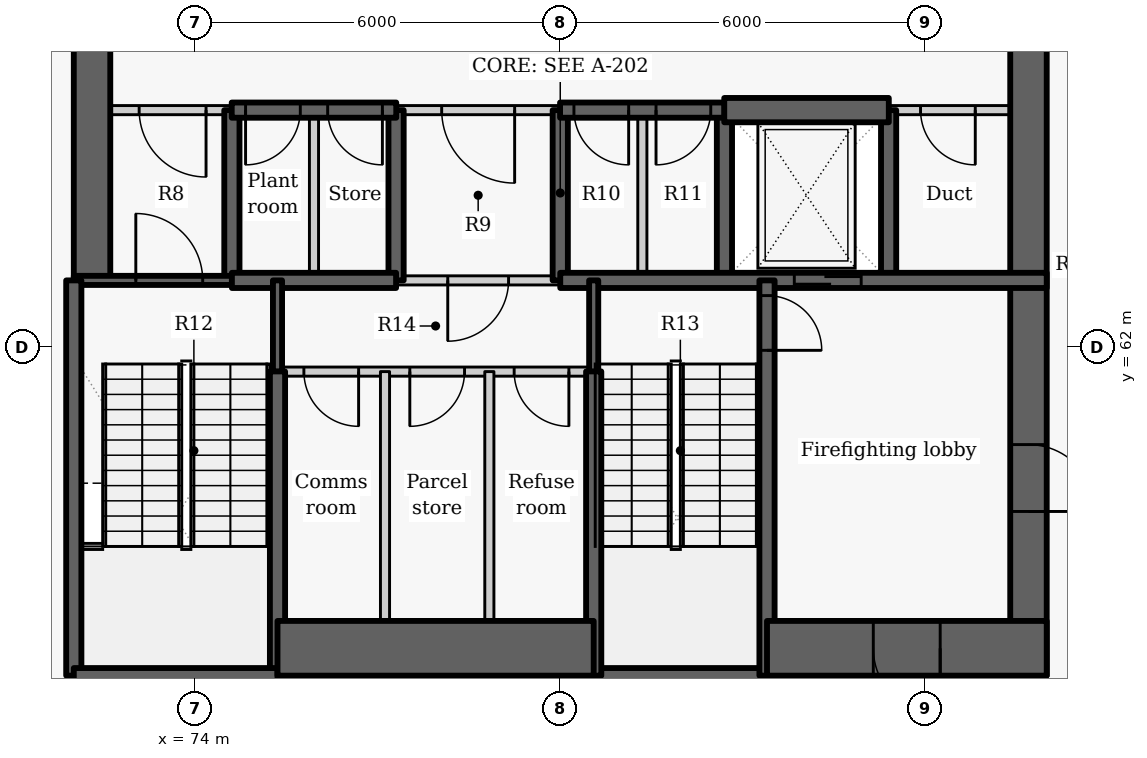
"""IFC4 building model, lengths in metres.
Left out: names, types, materials, properties, quantities, classifications, styles, units other than length and angle.
Written with IfcOpenShell. Run it as: python <this file> out.ifc"""

import sys

from ifc_helpers import new_model, si_unit, direction, frame, frame_2d, origin, place, context, subcontext, project, spatial, rectangle, extrude, element, fill, save


model = new_model("IFC4")
c1 = context("Model", 3, precision=1e-05, world=origin(), true_north=direction((0.0, 1.0)))
c2 = subcontext(c1, "Body", "Model", "MODEL_VIEW")
j1 = project(units=[si_unit("LENGTHUNIT", "METRE"), si_unit("PLANEANGLEUNIT", "RADIAN")], contexts=[c1])
p1 = place(None, origin())
s1 = spatial("IfcSite", under=j1, at=p1, CompositionType="ELEMENT")
p2 = place(p1, origin())
s2 = spatial("IfcBuilding", under=s1, at=p2, CompositionType="ELEMENT")
p3 = place(p2, frame((0.0, 0.0, 6.6)))
s3 = spatial("IfcBuildingStorey", under=s2, at=p3, CompositionType="ELEMENT", Elevation=6.6)
p4 = place(p3, frame((74.6, 63.1, -0.3), z_axis=(0.0, 0.0, 1.0), x_axis=(0.0, 1.0, 0.0)))
e1 = element("IfcWall", 1, at=p4, inside=s3, PredefinedType="SHEAR", context=c2, shape_type="SweptSolid", body=[
    extrude(rectangle(XDim=2.8, YDim=0.25, at=frame_2d((1.4, 0.0))), origin(), (0.0, 0.0, 1.0), 4.8),
])
p5 = place(p3, frame((72.3, 63.1, -0.3), z_axis=(0.0, 0.0, 1.0), x_axis=(0.0, 1.0, 0.0)))
e2 = element("IfcWall", 2, at=p5, inside=s3, PredefinedType="SHEAR", context=c2, shape_type="SweptSolid", body=[
    extrude(rectangle(XDim=9.1, YDim=0.6, at=frame_2d((4.55, 0.0))), origin(), (0.0, 0.0, 1.0), 4.8),
])
for number, where, z_axis, x_axis in (
    (3, (77.3, 63.1, -0.3), (0.0, 0.0, 1.0), (0.0, 1.0, 0.0)),
    (4, (80.0, 63.1, -0.3), (0.0, 0.0, 1.0), (0.0, 1.0, 0.0)),
    (5, (82.7, 63.1, -0.3), (0.0, 0.0, 1.0), (0.0, 1.0, 0.0)),
    (6, (85.4, 63.1, -0.3), (0.0, 0.0, 1.0), (0.0, 1.0, 0.0)),
):
    element("IfcWall", number, at=place(p3, frame(where, z_axis=z_axis, x_axis=x_axis)), inside=s3, PredefinedType="SHEAR", context=c2, shape_type="SweptSolid", body=[
        extrude(rectangle(XDim=2.8, YDim=0.25, at=frame_2d((1.4, 0.0))), origin(), (0.0, 0.0, 1.0), 4.8),
    ])
p6 = place(p3, frame((87.7, 72.2, -0.3), z_axis=(0.0, 0.0, 1.0), x_axis=(0.0, -1.0, 0.0)))
e7 = element("IfcWall", 7, at=p6, inside=s3, PredefinedType="SHEAR", context=c2, shape_type="SweptSolid", body=[
    extrude(rectangle(XDim=15.6, YDim=0.6, at=frame_2d((7.8, 0.0))), origin(), (0.0, 0.0, 1.0), 4.8),
])
p7 = place(p6, frame((11.8, 0.0, 0.3)))
e8 = element("IfcOpeningElement", 8, at=p7, cuts=e7, PredefinedType="OPENING", context=c2, shape_type="SweptSolid", body=[
    extrude(rectangle(XDim=1.1, YDim=2.1, at=frame_2d((0.55, 1.05))), frame((0.0, 0.31, 0.0), z_axis=(0.0, -1.0, 0.0), x_axis=(1.0, 0.0, 0.0)), (0.0, 0.0, 1.0), 0.62),
])
p8 = place(p3, frame((74.603, 65.9, 0.0), z_axis=(0.0, 0.0, 1.0), x_axis=(-1.0, 0.0, 0.0)))
e9 = element("IfcWall", 9, at=p8, inside=s3, PredefinedType="PARTITIONING", context=c2, shape_type="SweptSolid", body=[
    extrude(rectangle(XDim=2.603, YDim=0.15, at=frame_2d((1.302, 0.0))), origin(), (0.0, 0.0, 1.0), 4.5),
])
p9 = place(p8, frame((0.428, 0.0, 0.0)))
e10 = element("IfcOpeningElement", 10, at=p9, cuts=e9, PredefinedType="OPENING", context=c2, shape_type="SweptSolid", body=[
    extrude(rectangle(XDim=1.1, YDim=2.1, at=frame_2d((0.55, 1.05))), frame((0.0, 0.085, 0.0), z_axis=(0.0, -1.0, 0.0), x_axis=(1.0, 0.0, 0.0)), (0.0, 0.0, 1.0), 0.17),
])
p10 = place(p3, frame((80.003, 65.9, 0.0), z_axis=(0.0, 0.0, 1.0), x_axis=(-1.0, 0.0, 0.0)))
e11 = element("IfcWall", 11, at=p10, inside=s3, PredefinedType="PARTITIONING", context=c2, shape_type="SweptSolid", body=[
    extrude(rectangle(XDim=2.706, YDim=0.15, at=frame_2d((1.353, 0.0))), origin(), (0.0, 0.0, 1.0), 4.5),
])
p11 = place(p10, frame((0.753, 0.0, 0.0)))
e12 = element("IfcOpeningElement", 12, at=p11, cuts=e11, PredefinedType="OPENING", context=c2, shape_type="SweptSolid", body=[
    extrude(rectangle(XDim=1.2, YDim=2.1, at=frame_2d((0.6, 1.05))), frame((0.0, 0.085, 0.0), z_axis=(0.0, -1.0, 0.0), x_axis=(1.0, 0.0, 0.0)), (0.0, 0.0, 1.0), 0.17),
])
p12 = place(p3, frame((88.0, 65.9, 0.0), z_axis=(0.0, 0.0, 1.0), x_axis=(-1.0, 0.0, 0.0)))
e13 = element("IfcWall", 13, at=p12, inside=s3, PredefinedType="PARTITIONING", context=c2, shape_type="SweptSolid", body=[
    extrude(rectangle(XDim=2.603, YDim=0.15, at=frame_2d((1.302, 0.0))), origin(), (0.0, 0.0, 1.0), 4.5),
])
p13 = place(p12, frame((1.175, 0.0, 0.0)))
e14 = element("IfcOpeningElement", 14, at=p13, cuts=e13, PredefinedType="OPENING", context=c2, shape_type="SweptSolid", body=[
    extrude(rectangle(XDim=0.9, YDim=2.1, at=frame_2d((0.45, 1.05))), frame((0.0, 0.085, 0.0), z_axis=(0.0, -1.0, 0.0), x_axis=(1.0, 0.0, 0.0)), (0.0, 0.0, 1.0), 0.17),
])
p14 = place(p3, frame((77.303, 65.9, -0.3), z_axis=(0.0, 0.0, 1.0), x_axis=(-1.0, 0.0, 0.0)))
e15 = element("IfcWall", 15, at=p14, inside=s3, PredefinedType="SHEAR", context=c2, shape_type="SweptSolid", body=[
    extrude(rectangle(XDim=2.706, YDim=0.25, at=frame_2d((1.353, 0.0))), origin(), (0.0, 0.0, 1.0), 4.8),
])
p15 = place(p14, frame((1.578, 0.0, 0.3)))
e16 = element("IfcOpeningElement", 16, at=p15, cuts=e15, PredefinedType="OPENING", context=c2, shape_type="SweptSolid", body=[
    extrude(rectangle(XDim=0.9, YDim=2.1, at=frame_2d((0.45, 1.05))), frame((0.0, 0.135, 0.0), z_axis=(0.0, -1.0, 0.0), x_axis=(1.0, 0.0, 0.0)), (0.0, 0.0, 1.0), 0.27),
])
p16 = place(p14, frame((0.228, 0.0, 0.3)))
e17 = element("IfcOpeningElement", 17, at=p16, cuts=e15, PredefinedType="OPENING", context=c2, shape_type="SweptSolid", body=[
    extrude(rectangle(XDim=0.9, YDim=2.1, at=frame_2d((0.45, 1.05))), frame((0.0, 0.135, 0.0), z_axis=(0.0, -1.0, 0.0), x_axis=(1.0, 0.0, 0.0)), (0.0, 0.0, 1.0), 0.27),
])
p17 = place(p3, frame((82.703, 65.9, -0.3), z_axis=(0.0, 0.0, 1.0), x_axis=(-1.0, 0.0, 0.0)))
e18 = element("IfcWall", 18, at=p17, inside=s3, PredefinedType="SHEAR", context=c2, shape_type="SweptSolid", body=[
    extrude(rectangle(XDim=2.706, YDim=0.25, at=frame_2d((1.353, 0.0))), origin(), (0.0, 0.0, 1.0), 4.8),
])
p18 = place(p17, frame((1.578, 0.0, 0.3)))
e19 = element("IfcOpeningElement", 19, at=p18, cuts=e18, PredefinedType="OPENING", context=c2, shape_type="SweptSolid", body=[
    extrude(rectangle(XDim=0.9, YDim=2.1, at=frame_2d((0.45, 1.05))), frame((0.0, 0.135, 0.0), z_axis=(0.0, -1.0, 0.0), x_axis=(1.0, 0.0, 0.0)), (0.0, 0.0, 1.0), 0.27),
])
p19 = place(p17, frame((0.228, 0.0, 0.3)))
e20 = element("IfcOpeningElement", 20, at=p19, cuts=e18, PredefinedType="OPENING", context=c2, shape_type="SweptSolid", body=[
    extrude(rectangle(XDim=0.9, YDim=2.1, at=frame_2d((0.45, 1.05))), frame((0.0, 0.135, 0.0), z_axis=(0.0, -1.0, 0.0), x_axis=(1.0, 0.0, 0.0)), (0.0, 0.0, 1.0), 0.27),
])
p20 = place(p3, frame((82.697, 65.9, -0.3), z_axis=(0.0, 0.0, 1.0), x_axis=(1.0, 0.0, 0.0)))
e21 = element("IfcWall", 21, at=p20, inside=s3, PredefinedType="SHEAR", context=c2, shape_type="SweptSolid", body=[
    extrude(rectangle(XDim=2.706, YDim=0.4, at=frame_2d((1.353, 0.0))), origin(), (0.0, 0.0, 1.0), 4.8),
])
p21 = place(p3, frame((72.0, 63.1, -0.3), z_axis=(0.0, 0.0, 1.0), x_axis=(1.0, 0.0, 0.0)))
e22 = element("IfcWall", 22, at=p21, inside=s3, PredefinedType="SHEAR", context=c2, shape_type="SweptSolid", body=[
    extrude(rectangle(XDim=2.6, YDim=0.15, at=frame_2d((1.3, 0.0))), origin(), (0.0, 0.0, 1.0), 4.8),
])
p22 = place(p21, frame((1.02, 0.0, 0.3)))
e23 = element("IfcOpeningElement", 23, at=p22, cuts=e22, PredefinedType="OPENING", context=c2, shape_type="SweptSolid", body=[
    extrude(rectangle(XDim=1.1, YDim=2.1, at=frame_2d((0.55, 1.05))), frame((0.0, 0.085, 0.0), z_axis=(0.0, -1.0, 0.0), x_axis=(1.0, 0.0, 0.0)), (0.0, 0.0, 1.0), 0.17),
])
p23 = place(p3, frame((75.95, 63.1, 0.0), z_axis=(0.0, 0.0, 1.0), x_axis=(0.0, 1.0, 0.0)))
e24 = element("IfcWall", 24, at=p23, inside=s3, PredefinedType="PARTITIONING", context=c2, shape_type="SweptSolid", body=[
    extrude(rectangle(XDim=2.8, YDim=0.15, at=frame_2d((1.4, 0.0))), origin(), (0.0, 0.0, 1.0), 4.5),
])
p24 = place(p3, frame((74.6, 63.1, -0.3), z_axis=(0.0, 0.0, 1.0), x_axis=(1.0, 0.0, 0.0)))
e25 = element("IfcWall", 25, at=p24, inside=s3, PredefinedType="SHEAR", context=c2, shape_type="SweptSolid", body=[
    extrude(rectangle(XDim=2.7, YDim=0.25, at=frame_2d((1.35, 0.0))), origin(), (0.0, 0.0, 1.0), 4.8),
])
p25 = place(p3, frame((80.0, 63.1, -0.3), z_axis=(0.0, 0.0, 1.0), x_axis=(1.0, 0.0, 0.0)))
e26 = element("IfcWall", 26, at=p25, inside=s3, PredefinedType="SHEAR", context=c2, shape_type="SweptSolid", body=[
    extrude(rectangle(XDim=8.0, YDim=0.25, at=frame_2d((4.0, 0.0))), origin(), (0.0, 0.0, 1.0), 4.8),
])
p26 = place(p25, frame((3.849, 0.0, 0.3)))
e27 = element("IfcOpeningElement", 27, at=p26, cuts=e26, PredefinedType="OPENING", context=c2, shape_type="SweptSolid", body=[
    extrude(rectangle(XDim=1.1, YDim=2.1, at=frame_2d((0.55, 1.05))), frame((0.0, 0.135, 0.0), z_axis=(0.0, -1.0, 0.0), x_axis=(1.0, 0.0, 0.0)), (0.0, 0.0, 1.0), 0.27),
])
p27 = place(p3, frame((80.0, 63.1, 0.0), z_axis=(0.0, 0.0, 1.0), x_axis=(-1.0, 0.0, 0.0)))
e28 = element("IfcWall", 28, at=p27, inside=s3, PredefinedType="PARTITIONING", context=c2, shape_type="SweptSolid", body=[
    extrude(rectangle(XDim=2.7, YDim=0.15, at=frame_2d((1.35, 0.0))), origin(), (0.0, 0.0, 1.0), 4.5),
])
p28 = place(p27, frame((0.85, 0.0, 0.0)))
e29 = element("IfcOpeningElement", 29, at=p28, cuts=e28, PredefinedType="OPENING", context=c2, shape_type="SweptSolid", body=[
    extrude(rectangle(XDim=1.0, YDim=2.1, at=frame_2d((0.5, 1.05))), frame((0.0, 0.085, 0.0), z_axis=(0.0, -1.0, 0.0), x_axis=(1.0, 0.0, 0.0)), (0.0, 0.0, 1.0), 0.17),
])
p29 = place(p3, frame((81.35, 63.1, 0.0), z_axis=(0.0, 0.0, 1.0), x_axis=(0.0, 1.0, 0.0)))
e30 = element("IfcWall", 30, at=p29, inside=s3, PredefinedType="PARTITIONING", context=c2, shape_type="SweptSolid", body=[
    extrude(rectangle(XDim=2.8, YDim=0.15, at=frame_2d((1.4, 0.0))), origin(), (0.0, 0.0, 1.0), 4.5),
])
p30 = place(p3, frame((75.35, 61.597, -0.3), z_axis=(0.0, 0.0, 1.0), x_axis=(0.0, 1.0, 0.0)))
e31 = element("IfcWall", 31, at=p30, inside=s3, PredefinedType="SHEAR", context=c2, shape_type="SweptSolid", body=[
    extrude(rectangle(XDim=1.503, YDim=0.15, at=frame_2d((0.751, 0.0))), origin(), (0.0, 0.0, 1.0), 4.8),
])
p31 = place(p3, frame((75.35, 56.6, -0.3), z_axis=(0.0, 0.0, 1.0), x_axis=(0.0, 1.0, 0.0)))
e32 = element("IfcWall", 32, at=p31, inside=s3, PredefinedType="SHEAR", context=c2, shape_type="SweptSolid", body=[
    extrude(rectangle(XDim=5.003, YDim=0.25, at=frame_2d((2.501, 0.0))), origin(), (0.0, 0.0, 1.0), 4.8),
])
p32 = place(p3, frame((72.0, 56.6, -0.3), z_axis=(0.0, 0.0, 1.0), x_axis=(0.0, 1.0, 0.0)))
e33 = element("IfcWall", 33, at=p32, inside=s3, PredefinedType="SHEAR", context=c2, shape_type="SweptSolid", body=[
    extrude(rectangle(XDim=6.5, YDim=0.25, at=frame_2d((3.25, 0.0))), origin(), (0.0, 0.0, 1.0), 4.8),
])
p33 = place(p3, frame((72.0, 56.6, -0.3), z_axis=(0.0, 0.0, 1.0), x_axis=(1.0, 0.0, 0.0)))
e34 = element("IfcWall", 34, at=p33, inside=s3, PredefinedType="SHEAR", context=c2, shape_type="SweptSolid", body=[
    extrude(rectangle(XDim=3.35, YDim=0.25, at=frame_2d((1.675, 0.0))), origin(), (0.0, 0.0, 1.0), 4.8),
])
p34 = place(p3, frame((80.55, 56.6, -0.3), z_axis=(0.0, 0.0, 1.0), x_axis=(1.0, 0.0, 0.0)))
e35 = element("IfcWall", 35, at=p34, inside=s3, PredefinedType="SHEAR", context=c2, shape_type="SweptSolid", body=[
    extrude(rectangle(XDim=2.85, YDim=0.25, at=frame_2d((1.425, 0.0))), origin(), (0.0, 0.0, 1.0), 4.8),
])
p35 = place(p3, frame((83.4, 63.1, -0.3), z_axis=(0.0, 0.0, 1.0), x_axis=(0.0, -1.0, 0.0)))
e36 = element("IfcWall", 36, at=p35, inside=s3, PredefinedType="SHEAR", context=c2, shape_type="SweptSolid", body=[
    extrude(rectangle(XDim=6.5, YDim=0.25, at=frame_2d((3.25, 0.0))), origin(), (0.0, 0.0, 1.0), 4.8),
])
p36 = place(p35, frame((0.25, 0.0, 0.3)))
e37 = element("IfcOpeningElement", 37, at=p36, cuts=e36, PredefinedType="OPENING", context=c2, shape_type="SweptSolid", body=[
    extrude(rectangle(XDim=0.9, YDim=2.1, at=frame_2d((0.45, 1.05))), frame((0.0, 0.135, 0.0), z_axis=(0.0, -1.0, 0.0), x_axis=(1.0, 0.0, 0.0)), (0.0, 0.0, 1.0), 0.27),
])
p37 = place(p3, frame((80.55, 61.597, -0.3), z_axis=(0.0, 0.0, 1.0), x_axis=(0.0, 1.0, 0.0)))
e38 = element("IfcWall", 38, at=p37, inside=s3, PredefinedType="SHEAR", context=c2, shape_type="SweptSolid", body=[
    extrude(rectangle(XDim=1.503, YDim=0.15, at=frame_2d((0.751, 0.0))), origin(), (0.0, 0.0, 1.0), 4.8),
])
p38 = place(p3, frame((80.55, 56.6, -0.3), z_axis=(0.0, 0.0, 1.0), x_axis=(0.0, 1.0, 0.0)))
e39 = element("IfcWall", 39, at=p38, inside=s3, PredefinedType="SHEAR", context=c2, shape_type="SweptSolid", body=[
    extrude(rectangle(XDim=5.003, YDim=0.25, at=frame_2d((2.501, 0.0))), origin(), (0.0, 0.0, 1.0), 4.8),
])
p39 = place(p3, frame((75.35, 57.05, -0.3), z_axis=(0.0, 0.0, 1.0), x_axis=(1.0, 0.0, 0.0)))
e40 = element("IfcWall", 40, at=p39, inside=s3, PredefinedType="SHEAR", context=c2, shape_type="SweptSolid", body=[
    extrude(rectangle(XDim=5.2, YDim=0.9, at=frame_2d((2.6, 0.0))), origin(), (0.0, 0.0, 1.0), 4.8),
])
p40 = place(p3, frame((88.0, 57.05, -0.3), z_axis=(0.0, 0.0, 1.0), x_axis=(-1.0, 0.0, 0.0)))
e41 = element("IfcWall", 41, at=p40, inside=s3, PredefinedType="SHEAR", context=c2, shape_type="SweptSolid", body=[
    extrude(rectangle(XDim=4.6, YDim=0.9, at=frame_2d((2.3, 0.0))), origin(), (0.0, 0.0, 1.0), 4.8),
])
p41 = place(p40, frame((1.752, 0.0, 0.3)))
e42 = element("IfcOpeningElement", 42, at=p41, cuts=e41, PredefinedType="OPENING", context=c2, shape_type="SweptSolid", body=[
    extrude(rectangle(XDim=1.1, YDim=2.1, at=frame_2d((0.55, 1.05))), frame((0.0, 0.46, 0.0), z_axis=(0.0, -1.0, 0.0), x_axis=(1.0, 0.0, 0.0)), (0.0, 0.0, 1.0), 0.92),
])
p42 = place(p3, frame((80.55, 61.6, 0.0), z_axis=(0.0, 0.0, 1.0), x_axis=(-1.0, 0.0, 0.0)))
e43 = element("IfcWall", 43, at=p42, inside=s3, PredefinedType="PARTITIONING", context=c2, shape_type="SweptSolid", body=[
    extrude(rectangle(XDim=5.2, YDim=0.15, at=frame_2d((2.6, 0.0))), origin(), (0.0, 0.0, 1.0), 4.5),
])
p43 = place(p42, frame((3.866, 0.0, 0.0)))
e44 = element("IfcOpeningElement", 44, at=p43, cuts=e43, PredefinedType="OPENING", context=c2, shape_type="SweptSolid", body=[
    extrude(rectangle(XDim=0.9, YDim=2.1, at=frame_2d((0.45, 1.05))), frame((0.0, 0.085, 0.0), z_axis=(0.0, -1.0, 0.0), x_axis=(1.0, 0.0, 0.0)), (0.0, 0.0, 1.0), 0.17),
])
p44 = place(p42, frame((2.124, 0.0, 0.0)))
e45 = element("IfcOpeningElement", 45, at=p44, cuts=e43, PredefinedType="OPENING", context=c2, shape_type="SweptSolid", body=[
    extrude(rectangle(XDim=0.9, YDim=2.1, at=frame_2d((0.45, 1.05))), frame((0.0, 0.085, 0.0), z_axis=(0.0, -1.0, 0.0), x_axis=(1.0, 0.0, 0.0)), (0.0, 0.0, 1.0), 0.17),
])
p45 = place(p42, frame((0.408, 0.0, 0.0)))
e46 = element("IfcOpeningElement", 46, at=p45, cuts=e43, PredefinedType="OPENING", context=c2, shape_type="SweptSolid", body=[
    extrude(rectangle(XDim=0.9, YDim=2.1, at=frame_2d((0.45, 1.05))), frame((0.0, 0.085, 0.0), z_axis=(0.0, -1.0, 0.0), x_axis=(1.0, 0.0, 0.0)), (0.0, 0.0, 1.0), 0.17),
])
for number, where, z_axis, x_axis in (
    (47, (77.118, 56.6, 0.0), (0.0, 0.0, 1.0), (0.0, 1.0, 0.0)),
    (48, (78.834, 56.6, 0.0), (0.0, 0.0, 1.0), (0.0, 1.0, 0.0)),
):
    element("IfcWall", number, at=place(p3, frame(where, z_axis=z_axis, x_axis=x_axis)), inside=s3, PredefinedType="PARTITIONING", context=c2, shape_type="SweptSolid", body=[
        extrude(rectangle(XDim=5.0, YDim=0.15, at=frame_2d((2.5, 0.0))), origin(), (0.0, 0.0, 1.0), 4.5),
    ])
p46 = place(p9, origin())
e49 = element("IfcDoor", 49, at=p46, inside=s3, OperationType="SINGLE_SWING_LEFT", PredefinedType="DOOR", context=c2, shape_type="SweptSolid", body=[
    extrude(rectangle(XDim=1.1, YDim=2.1, at=frame_2d((0.55, 1.05))), frame((0.0, 0.025, 0.0), z_axis=(0.0, -1.0, 0.0), x_axis=(1.0, 0.0, 0.0)), (0.0, 0.0, 1.0), 0.05),
])
fill(e10, e49)
p47 = place(p15, origin())
e50 = element("IfcDoor", 50, at=p47, inside=s3, OperationType="SINGLE_SWING_RIGHT", PredefinedType="DOOR", context=c2, shape_type="SweptSolid", body=[
    extrude(rectangle(XDim=0.9, YDim=2.1, at=frame_2d((0.45, 1.05))), frame((0.0, 0.025, 0.0), z_axis=(0.0, -1.0, 0.0), x_axis=(1.0, 0.0, 0.0)), (0.0, 0.0, 1.0), 0.05),
])
fill(e16, e50)
p48 = place(p16, origin())
e51 = element("IfcDoor", 51, at=p48, inside=s3, OperationType="SINGLE_SWING_LEFT", PredefinedType="DOOR", context=c2, shape_type="SweptSolid", body=[
    extrude(rectangle(XDim=0.9, YDim=2.1, at=frame_2d((0.45, 1.05))), frame((0.0, 0.025, 0.0), z_axis=(0.0, -1.0, 0.0), x_axis=(1.0, 0.0, 0.0)), (0.0, 0.0, 1.0), 0.05),
])
fill(e17, e51)
p49 = place(p11, origin())
e52 = element("IfcDoor", 52, at=p49, inside=s3, OperationType="DOUBLE_DOOR_SINGLE_SWING", PredefinedType="DOOR", context=c2, shape_type="SweptSolid", body=[
    extrude(rectangle(XDim=1.2, YDim=2.1, at=frame_2d((0.6, 1.05))), frame((0.0, 0.025, 0.0), z_axis=(0.0, -1.0, 0.0), x_axis=(1.0, 0.0, 0.0)), (0.0, 0.0, 1.0), 0.05),
])
fill(e12, e52)
p50 = place(p18, origin())
e53 = element("IfcDoor", 53, at=p50, inside=s3, OperationType="SINGLE_SWING_LEFT", PredefinedType="DOOR", context=c2, shape_type="SweptSolid", body=[
    extrude(rectangle(XDim=0.9, YDim=2.1, at=frame_2d((0.45, 1.05))), frame((0.0, 0.025, 0.0), z_axis=(0.0, -1.0, 0.0), x_axis=(1.0, 0.0, 0.0)), (0.0, 0.0, 1.0), 0.05),
])
fill(e19, e53)
p51 = place(p19, origin())
e54 = element("IfcDoor", 54, at=p51, inside=s3, OperationType="SINGLE_SWING_RIGHT", PredefinedType="DOOR", context=c2, shape_type="SweptSolid", body=[
    extrude(rectangle(XDim=0.9, YDim=2.1, at=frame_2d((0.45, 1.05))), frame((0.0, 0.025, 0.0), z_axis=(0.0, -1.0, 0.0), x_axis=(1.0, 0.0, 0.0)), (0.0, 0.0, 1.0), 0.05),
])
fill(e20, e54)
p52 = place(p26, origin())
e55 = element("IfcDoor", 55, at=p52, inside=s3, OperationType="SLIDING_TO_LEFT", PredefinedType="DOOR", context=c2, shape_type="SweptSolid", body=[
    extrude(rectangle(XDim=1.1, YDim=2.1, at=frame_2d((0.55, 1.05))), frame((0.0, 0.025, 0.0), z_axis=(0.0, -1.0, 0.0), x_axis=(1.0, 0.0, 0.0)), (0.0, 0.0, 1.0), 0.05),
])
fill(e27, e55)
p53 = place(p13, origin())
e56 = element("IfcDoor", 56, at=p53, inside=s3, OperationType="SINGLE_SWING_LEFT", PredefinedType="DOOR", context=c2, shape_type="SweptSolid", body=[
    extrude(rectangle(XDim=0.9, YDim=2.1, at=frame_2d((0.45, 1.05))), frame((0.0, 0.025, 0.0), z_axis=(0.0, -1.0, 0.0), x_axis=(1.0, 0.0, 0.0)), (0.0, 0.0, 1.0), 0.05),
])
fill(e14, e56)
p54 = place(p28, origin())
e57 = element("IfcDoor", 57, at=p54, inside=s3, OperationType="SINGLE_SWING_RIGHT", PredefinedType="DOOR", context=c2, shape_type="SweptSolid", body=[
    extrude(rectangle(XDim=1.0, YDim=2.1, at=frame_2d((0.5, 1.05))), frame((0.0, 0.025, 0.0), z_axis=(0.0, -1.0, 0.0), x_axis=(1.0, 0.0, 0.0)), (0.0, 0.0, 1.0), 0.05),
])
fill(e29, e57)
p55 = place(p43, origin())
e58 = element("IfcDoor", 58, at=p55, inside=s3, OperationType="SINGLE_SWING_LEFT", PredefinedType="DOOR", context=c2, shape_type="SweptSolid", body=[
    extrude(rectangle(XDim=0.9, YDim=2.1, at=frame_2d((0.45, 1.05))), frame((0.0, 0.025, 0.0), z_axis=(0.0, -1.0, 0.0), x_axis=(1.0, 0.0, 0.0)), (0.0, 0.0, 1.0), 0.05),
])
fill(e44, e58)
p56 = place(p44, origin())
e59 = element("IfcDoor", 59, at=p56, inside=s3, OperationType="SINGLE_SWING_RIGHT", PredefinedType="DOOR", context=c2, shape_type="SweptSolid", body=[
    extrude(rectangle(XDim=0.9, YDim=2.1, at=frame_2d((0.45, 1.05))), frame((0.0, 0.025, 0.0), z_axis=(0.0, -1.0, 0.0), x_axis=(1.0, 0.0, 0.0)), (0.0, 0.0, 1.0), 0.05),
])
fill(e45, e59)
p57 = place(p45, origin())
e60 = element("IfcDoor", 60, at=p57, inside=s3, OperationType="SINGLE_SWING_LEFT", PredefinedType="DOOR", context=c2, shape_type="SweptSolid", body=[
    extrude(rectangle(XDim=0.9, YDim=2.1, at=frame_2d((0.45, 1.05))), frame((0.0, 0.025, 0.0), z_axis=(0.0, -1.0, 0.0), x_axis=(1.0, 0.0, 0.0)), (0.0, 0.0, 1.0), 0.05),
])
fill(e46, e60)
p58 = place(p22, origin())
e61 = element("IfcDoor", 61, at=p58, inside=s3, OperationType="SINGLE_SWING_LEFT", PredefinedType="DOOR", context=c2, shape_type="SweptSolid", body=[
    extrude(rectangle(XDim=1.1, YDim=2.1, at=frame_2d((0.55, 1.05))), frame((0.0, 0.025, 0.0), z_axis=(0.0, -1.0, 0.0), x_axis=(1.0, 0.0, 0.0)), (0.0, 0.0, 1.0), 0.05),
])
fill(e23, e61)
p59 = place(p36, origin())
e62 = element("IfcDoor", 62, at=p59, inside=s3, OperationType="SINGLE_SWING_RIGHT", PredefinedType="DOOR", context=c2, shape_type="SweptSolid", body=[
    extrude(rectangle(XDim=0.9, YDim=2.1, at=frame_2d((0.45, 1.05))), frame((0.0, 0.025, 0.0), z_axis=(0.0, -1.0, 0.0), x_axis=(1.0, 0.0, 0.0)), (0.0, 0.0, 1.0), 0.05),
])
fill(e37, e62)
p60 = place(p7, origin())
e63 = element("IfcDoor", 63, at=p60, inside=s3, OperationType="SINGLE_SWING_RIGHT", PredefinedType="DOOR", context=c2, shape_type="SweptSolid", body=[
    extrude(rectangle(XDim=1.1, YDim=2.1, at=frame_2d((0.55, 1.05))), frame((0.0, 0.025, 0.0), z_axis=(0.0, -1.0, 0.0), x_axis=(1.0, 0.0, 0.0)), (0.0, 0.0, 1.0), 0.05),
])
fill(e8, e63)
p61 = place(p41, origin())
e64 = element("IfcDoor", 64, at=p61, inside=s3, OperationType="SINGLE_SWING_LEFT", PredefinedType="DOOR", context=c2, shape_type="SweptSolid", body=[
    extrude(rectangle(XDim=1.1, YDim=2.1, at=frame_2d((0.55, 1.05))), frame((0.0, 0.025, 0.0), z_axis=(0.0, -1.0, 0.0), x_axis=(1.0, 0.0, 0.0)), (0.0, 0.0, 1.0), 0.05),
])
fill(e42, e64)
save(model, sys.argv[1])
